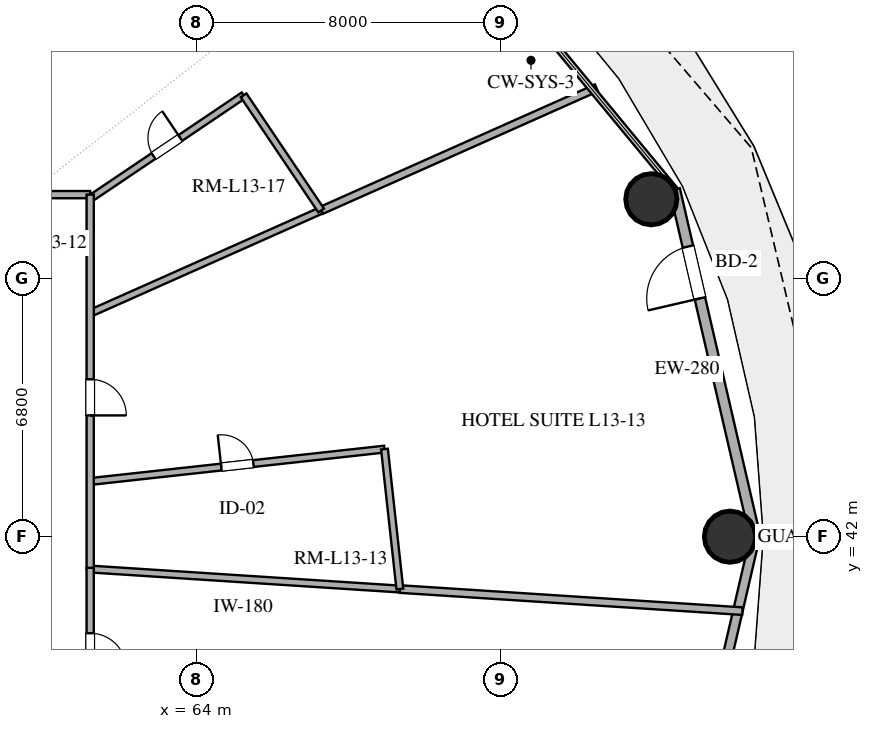
"""IFC4 building model, lengths in metres.
Left out: names, types, materials, properties, quantities, classifications, styles, units other than length and angle.
Written with IfcOpenShell. Run it as: python <this file> out.ifc"""

import sys

from ifc_helpers import new_model, si_unit, direction, frame, frame_2d, origin, origin_2d, place, context, subcontext, project, spatial, rectangle, hollow_circle, extrude, element, fill, save


model = new_model("IFC4")
c1 = context("Model", 3, precision=1e-05, world=origin(), true_north=direction((0.0, 1.0)))
c2 = subcontext(c1, "Body", "Model", "MODEL_VIEW")
j1 = project(units=[si_unit("LENGTHUNIT", "METRE"), si_unit("PLANEANGLEUNIT", "RADIAN")], contexts=[c1])
p1 = place(None, origin())
s1 = spatial("IfcSite", under=j1, at=p1, CompositionType="ELEMENT")
p2 = place(p1, origin())
s2 = spatial("IfcBuilding", under=s1, at=p2, CompositionType="ELEMENT")
p3 = place(p2, frame((0.0, 0.0, 57.0)))
s3 = spatial("IfcBuildingStorey", under=s2, at=p3, CompositionType="ELEMENT", Elevation=57.0)
for number, where, z_axis, x_axis in (
    (1, (78.035, 42.0, 0.0), (0.0, 0.0, 1.0), (1.0, 0.0, 0.0)),
    (2, (75.966, 50.878, 0.0), (0.0, 0.0, 1.0), (1.0, 0.0, 0.0)),
):
    element("IfcColumn", number, at=place(p3, frame(where, z_axis=z_axis, x_axis=x_axis)), inside=s3, PredefinedType="COLUMN", context=c2, shape_type="SweptSolid", body=[
        extrude(hollow_circle(Radius=0.675, WallThickness=0.036, at=origin_2d()), origin(), (0.0, 0.0, 1.0), 3.38),
    ])
p4 = place(p3, frame((78.696, 42.0, 0.0), z_axis=(0.0, 0.0, 1.0), x_axis=(-0.225454452941, 0.974253709076, 0.0)))
e3 = element("IfcWall", 3, at=p4, inside=s3, PredefinedType="SOLIDWALL", context=c2, shape_type="SweptSolid", body=[
    extrude(rectangle(XDim=9.38, YDim=0.28, at=frame_2d((4.69, 0.0))), origin(), (0.0, 0.0, 1.0), 3.38),
])
p5 = place(p4, frame((6.435, 0.0, 0.0)))
e4 = element("IfcOpeningElement", 4, at=p5, cuts=e3, PredefinedType="OPENING", context=c2, shape_type="SweptSolid", body=[
    extrude(rectangle(XDim=1.4, YDim=2.2, at=frame_2d((0.7, 1.1))), frame((0.0, 0.15, 0.0), z_axis=(0.0, -1.0, 0.0), x_axis=(1.0, 0.0, 0.0)), (0.0, 0.0, 1.0), 0.3),
])
p6 = place(p3, frame((76.581, 32.862, 0.0), z_axis=(0.0, 0.0, 1.0), x_axis=(0.225454452941, 0.974253709076, 0.0)))
e5 = element("IfcWall", 5, at=p6, inside=s3, PredefinedType="SOLIDWALL", context=c2, shape_type="SweptSolid", body=[
    extrude(rectangle(XDim=9.38, YDim=0.25, at=frame_2d((4.69, 0.0))), origin(), (0.0, 0.0, 1.0), 3.38),
])
p7 = place(p3, frame((63.96, 62.204, 0.0), z_axis=(0.0, 0.0, 1.0), x_axis=(-0.619889304847, -0.784689269543, 0.0)))
e6 = element("IfcWall", 6, at=p7, inside=s3, PredefinedType="PARTITIONING", context=c2, shape_type="SweptSolid", body=[
    extrude(rectangle(XDim=14.278, YDim=0.2, at=frame_2d((7.139, 0.0))), origin(), (0.0, 0.0, 1.0), 2.74),
])
p8 = place(p3, frame((78.364, 40.041, 0.0), z_axis=(0.0, 0.0, 1.0), x_axis=(-0.997924020497, 0.064402246198, 0.0)))
e7 = element("IfcWall", 7, at=p8, inside=s3, PredefinedType="PARTITIONING", context=c2, shape_type="SweptSolid", body=[
    extrude(rectangle(XDim=9.034, YDim=0.2, at=frame_2d((4.517, 0.0))), origin(), (0.0, 0.0, 1.0), 2.74),
])
p9 = place(p3, frame((69.349, 40.622, 0.0), z_axis=(0.0, 0.0, 1.0), x_axis=(-0.997924317455, 0.064397644621, 0.0)))
e8 = element("IfcWall", 8, at=p9, inside=s3, PredefinedType="PLUMBINGWALL", context=c2, shape_type="SweptSolid", body=[
    extrude(rectangle(XDim=8.166, YDim=0.18, at=frame_2d((4.083, 0.0))), origin(), (0.0, 0.0, 1.0), 2.74),
])
p10 = place(p3, frame((74.523, 53.809, 0.0), z_axis=(0.0, 0.0, 1.0), x_axis=(-0.913542208968, -0.40674393964, 0.0)))
e9 = element("IfcWall", 9, at=p10, inside=s3, PredefinedType="PARTITIONING", context=c2, shape_type="SweptSolid", body=[
    extrude(rectangle(XDim=7.93, YDim=0.2, at=frame_2d((3.965, 0.0))), origin(), (0.0, 0.0, 1.0), 2.74),
])
p11 = place(p3, frame((61.2, 43.452, 0.0), z_axis=(0.0, 0.0, 1.0), x_axis=(0.994005037085, 0.109334286708, 0.0)))
e10 = element("IfcWall", 10, at=p11, inside=s3, PredefinedType="PLUMBINGWALL", context=c2, shape_type="SweptSolid", body=[
    extrude(rectangle(XDim=7.791, YDim=0.18, at=frame_2d((3.896, 0.0))), origin(), (0.0, 0.0, 1.0), 2.74),
])
p12 = place(p11, frame((3.47, 0.0, 0.0)))
e11 = element("IfcOpeningElement", 11, at=p12, cuts=e10, PredefinedType="OPENING", context=c2, shape_type="SweptSolid", body=[
    extrude(rectangle(XDim=0.85, YDim=2.1, at=frame_2d((0.425, 1.05))), frame((0.0, 0.1, 0.0), z_axis=(0.0, -1.0, 0.0), x_axis=(1.0, 0.0, 0.0)), (0.0, 0.0, 1.0), 0.2),
])
p13 = place(p3, frame((67.278, 50.583, 0.0), z_axis=(0.0, 0.0, 1.0), x_axis=(-0.913551093465, -0.406723984575, 0.0)))
e12 = element("IfcWall", 12, at=p13, inside=s3, PredefinedType="PLUMBINGWALL", context=c2, shape_type="SweptSolid", body=[
    extrude(rectangle(XDim=6.653, YDim=0.18, at=frame_2d((3.327, 0.0))), origin(), (0.0, 0.0, 1.0), 2.74),
])
p14 = place(p3, frame((43.369, 51.0, 0.0), z_axis=(0.0, 0.0, 1.0), x_axis=(1.0, 0.0, 0.0)))
e13 = element("IfcWall", 13, at=p14, inside=s3, PredefinedType="PARTITIONING", context=c2, shape_type="SweptSolid", body=[
    extrude(rectangle(XDim=17.831, YDim=0.19, at=frame_2d((8.916, 0.0))), origin(), (0.0, 0.0, 1.0), 2.74),
])
p15 = place(p14, frame((14.29, 0.0, 0.0)))
e14 = element("IfcOpeningElement", 14, at=p15, cuts=e13, PredefinedType="OPENING", context=c2, shape_type="SweptSolid", body=[
    extrude(rectangle(XDim=0.95, YDim=2.15, at=frame_2d((0.475, 1.075))), frame((0.0, 0.105, 0.0), z_axis=(0.0, -1.0, 0.0), x_axis=(1.0, 0.0, 0.0)), (0.0, 0.0, 1.0), 0.21),
])
p16 = place(p14, frame((8.533, 0.0, 0.0)))
e15 = element("IfcOpeningElement", 15, at=p16, cuts=e13, PredefinedType="OPENING", context=c2, shape_type="SweptSolid", body=[
    extrude(rectangle(XDim=1.0, YDim=2.2, at=frame_2d((0.5, 1.1))), frame((0.0, 0.105, 0.0), z_axis=(0.0, -1.0, 0.0), x_axis=(1.0, 0.0, 0.0)), (0.0, 0.0, 1.0), 0.21),
])
p17 = place(p14, frame((3.591, 0.0, 0.0)))
e16 = element("IfcOpeningElement", 16, at=p17, cuts=e13, PredefinedType="OPENING", context=c2, shape_type="SweptSolid", body=[
    extrude(rectangle(XDim=1.0, YDim=2.2, at=frame_2d((0.5, 1.1))), frame((0.0, 0.105, 0.0), z_axis=(0.0, -1.0, 0.0), x_axis=(1.0, 0.0, 0.0)), (0.0, 0.0, 1.0), 0.21),
])
p18 = place(p3, frame((61.2, 50.893, 0.0), z_axis=(0.0, 0.0, 1.0), x_axis=(0.829362933151, 0.558710233587, 0.0)))
e17 = element("IfcWall", 17, at=p18, inside=s3, PredefinedType="PLUMBINGWALL", context=c2, shape_type="SweptSolid", body=[
    extrude(rectangle(XDim=4.867, YDim=0.18, at=frame_2d((2.434, 0.0))), origin(), (0.0, 0.0, 1.0), 2.74),
])
p19 = place(p18, frame((2.009, 0.0, 0.0)))
e18 = element("IfcOpeningElement", 18, at=p19, cuts=e17, PredefinedType="OPENING", context=c2, shape_type="SweptSolid", body=[
    extrude(rectangle(XDim=0.85, YDim=2.1, at=frame_2d((0.425, 1.05))), frame((0.0, 0.1, 0.0), z_axis=(0.0, -1.0, 0.0), x_axis=(1.0, 0.0, 0.0)), (0.0, 0.0, 1.0), 0.2),
])
p20 = place(p3, frame((61.2, 51.0, 0.0), z_axis=(0.0, 0.0, 1.0), x_axis=(0.0, -1.0, 0.0)))
e19 = element("IfcWall", 19, at=p20, inside=s3, PredefinedType="PARTITIONING", context=c2, shape_type="SweptSolid", body=[
    extrude(rectangle(XDim=9.852, YDim=0.19, at=frame_2d((4.926, 0.0))), origin(), (0.0, 0.0, 1.0), 2.74),
])
p21 = place(p20, frame((4.859, 0.0, 0.0)))
e20 = element("IfcOpeningElement", 20, at=p21, cuts=e19, PredefinedType="OPENING", context=c2, shape_type="SweptSolid", body=[
    extrude(rectangle(XDim=0.95, YDim=2.15, at=frame_2d((0.475, 1.075))), frame((0.0, 0.105, 0.0), z_axis=(0.0, -1.0, 0.0), x_axis=(1.0, 0.0, 0.0)), (0.0, 0.0, 1.0), 0.21),
])
p22 = place(p3, frame((61.2, 41.18, 0.0), z_axis=(0.0, 0.0, 1.0), x_axis=(0.0, -1.0, 0.0)))
e21 = element("IfcWall", 21, at=p22, inside=s3, PredefinedType="PARTITIONING", context=c2, shape_type="SweptSolid", body=[
    extrude(rectangle(XDim=8.18, YDim=0.19, at=frame_2d((4.09, 0.0))), origin(), (0.0, 0.0, 1.0), 2.74),
])
p23 = place(p22, frame((1.721, 0.0, 0.0)))
e22 = element("IfcOpeningElement", 22, at=p23, cuts=e21, PredefinedType="OPENING", context=c2, shape_type="SweptSolid", body=[
    extrude(rectangle(XDim=0.95, YDim=2.15, at=frame_2d((0.475, 1.075))), frame((0.0, 0.105, 0.0), z_axis=(0.0, -1.0, 0.0), x_axis=(1.0, 0.0, 0.0)), (0.0, 0.0, 1.0), 0.21),
])
p24 = place(p3, frame((68.944, 44.304, 0.0), z_axis=(0.0, 0.0, 1.0), x_axis=(0.109360669908, -0.994002134745, 0.0)))
e23 = element("IfcWall", 23, at=p24, inside=s3, PredefinedType="PLUMBINGWALL", context=c2, shape_type="SweptSolid", body=[
    extrude(rectangle(XDim=3.704, YDim=0.18, at=frame_2d((1.852, 0.0))), origin(), (0.0, 0.0, 1.0), 2.74),
])
p25 = place(p3, frame((65.237, 53.613, 0.0), z_axis=(0.0, 0.0, 1.0), x_axis=(0.558749555988, -0.829336441791, 0.0)))
e24 = element("IfcWall", 24, at=p25, inside=s3, PredefinedType="PLUMBINGWALL", context=c2, shape_type="SweptSolid", body=[
    extrude(rectangle(XDim=3.653, YDim=0.18, at=frame_2d((1.827, 0.0))), origin(), (0.0, 0.0, 1.0), 2.74),
])
p26 = place(p5, origin())
e25 = element("IfcDoor", 25, at=p26, inside=s3, OperationType="SINGLE_SWING_LEFT", PredefinedType="DOOR", context=c2, shape_type="SweptSolid", body=[
    extrude(rectangle(XDim=1.4, YDim=2.2, at=frame_2d((0.7, 1.1))), frame((0.0, 0.025, 0.0), z_axis=(0.0, -1.0, 0.0), x_axis=(1.0, 0.0, 0.0)), (0.0, 0.0, 1.0), 0.05),
])
fill(e4, e25)
p27 = place(p12, origin())
e26 = element("IfcDoor", 26, at=p27, inside=s3, OperationType="SINGLE_SWING_LEFT", PredefinedType="DOOR", context=c2, shape_type="SweptSolid", body=[
    extrude(rectangle(XDim=0.85, YDim=2.1, at=frame_2d((0.425, 1.05))), frame((0.0, 0.025, 0.0), z_axis=(0.0, -1.0, 0.0), x_axis=(1.0, 0.0, 0.0)), (0.0, 0.0, 1.0), 0.05),
])
fill(e11, e26)
p28 = place(p19, origin())
e27 = element("IfcDoor", 27, at=p28, inside=s3, OperationType="SINGLE_SWING_RIGHT", PredefinedType="DOOR", context=c2, shape_type="SweptSolid", body=[
    extrude(rectangle(XDim=0.85, YDim=2.1, at=frame_2d((0.425, 1.05))), frame((0.0, 0.025, 0.0), z_axis=(0.0, -1.0, 0.0), x_axis=(1.0, 0.0, 0.0)), (0.0, 0.0, 1.0), 0.05),
])
fill(e18, e27)
p29 = place(p21, origin())
e28 = element("IfcDoor", 28, at=p29, inside=s3, OperationType="SINGLE_SWING_RIGHT", PredefinedType="DOOR", context=c2, shape_type="SweptSolid", body=[
    extrude(rectangle(XDim=0.95, YDim=2.15, at=frame_2d((0.475, 1.075))), frame((0.0, 0.025, 0.0), z_axis=(0.0, -1.0, 0.0), x_axis=(1.0, 0.0, 0.0)), (0.0, 0.0, 1.0), 0.05),
])
fill(e20, e28)
p30 = place(p23, origin())
e29 = element("IfcDoor", 29, at=p30, inside=s3, OperationType="SINGLE_SWING_RIGHT", PredefinedType="DOOR", context=c2, shape_type="SweptSolid", body=[
    extrude(rectangle(XDim=0.95, YDim=2.15, at=frame_2d((0.475, 1.075))), frame((0.0, 0.025, 0.0), z_axis=(0.0, -1.0, 0.0), x_axis=(1.0, 0.0, 0.0)), (0.0, 0.0, 1.0), 0.05),
])
fill(e22, e29)
save(model, sys.argv[1])
